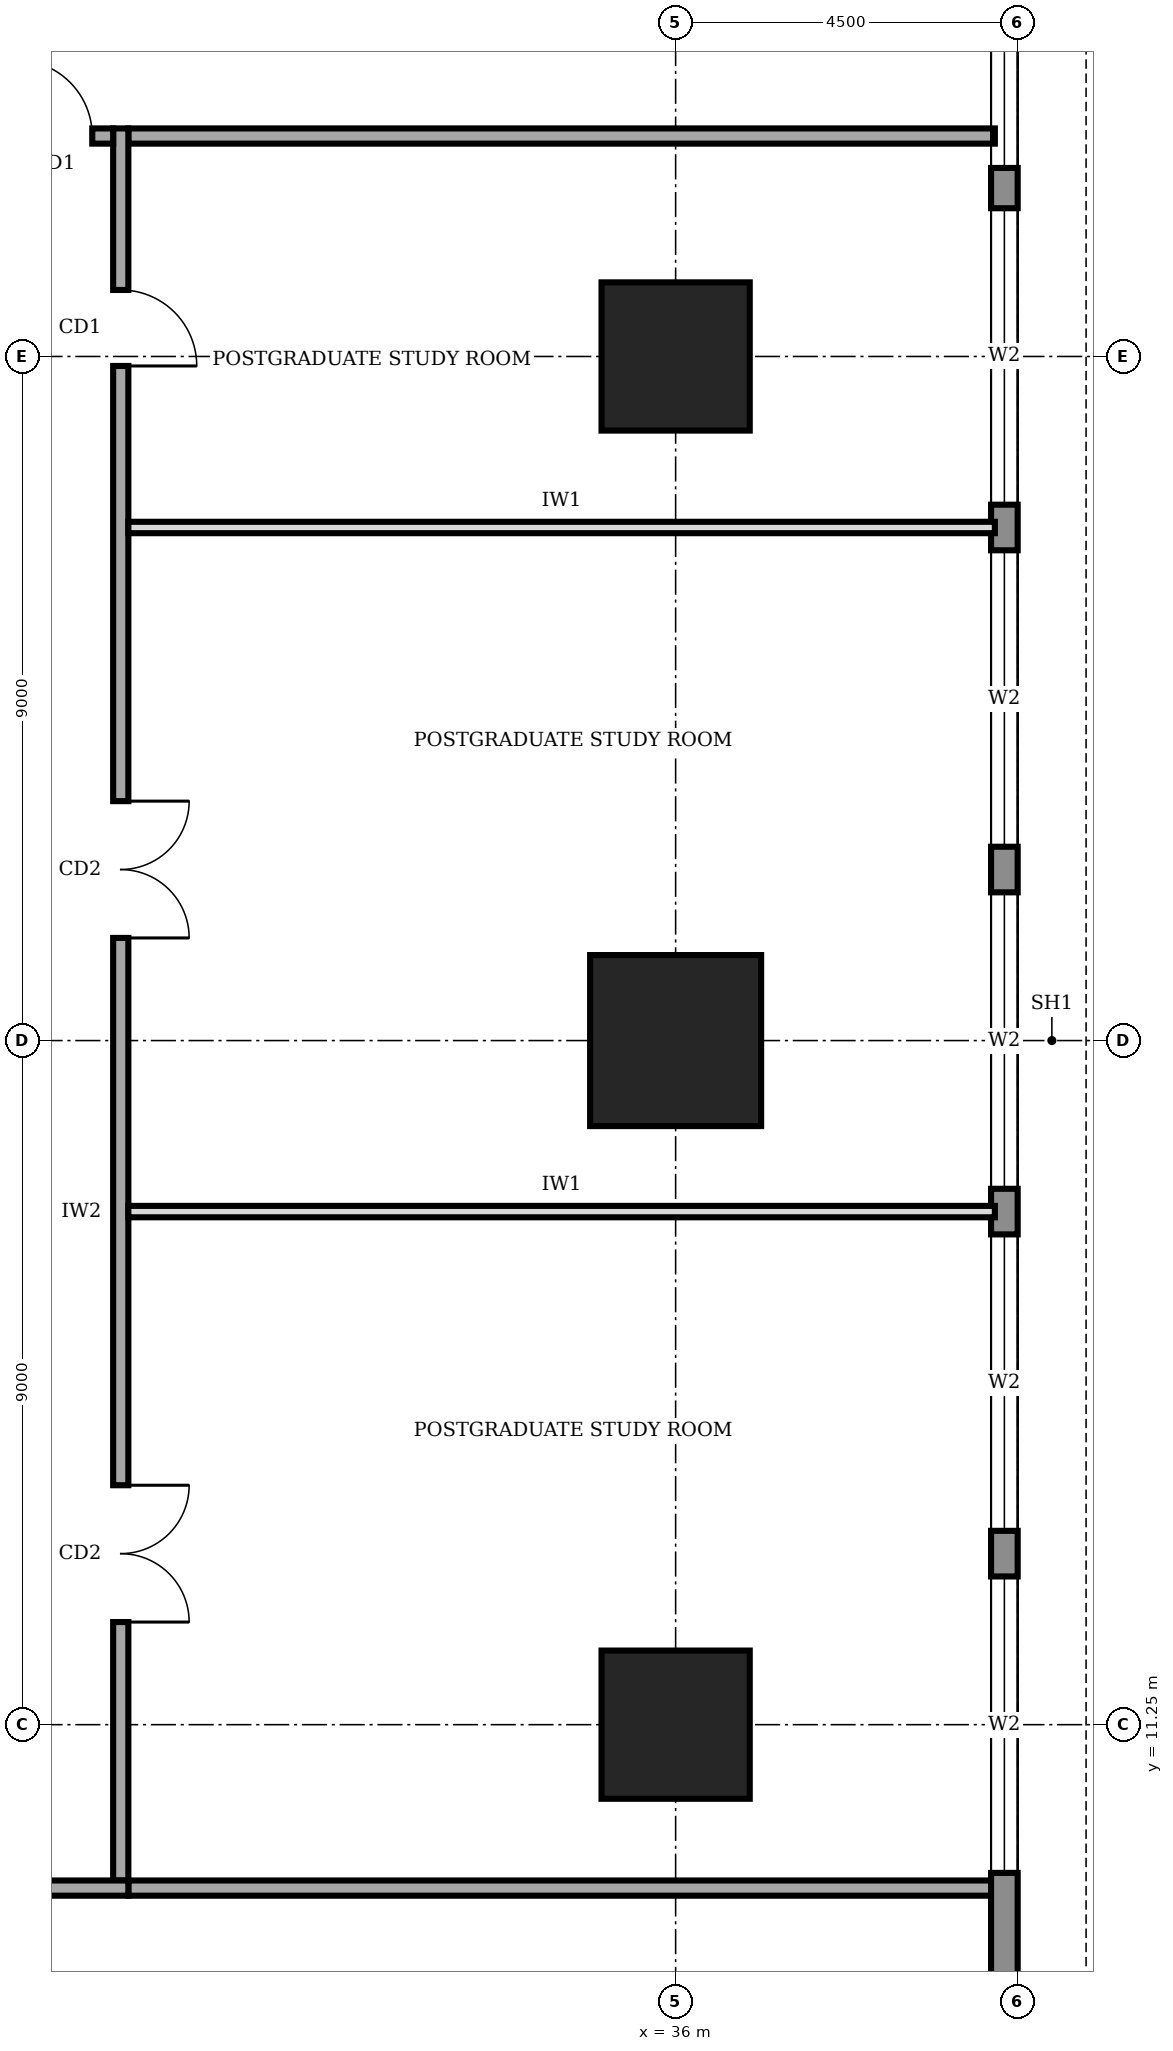
"""IFC4 building model, lengths in metres.
Left out: names, types, materials, properties, quantities, classifications, styles, units other than length and angle.
Written with IfcOpenShell. Run it as: python <this file> out.ifc"""

import sys

from ifc_helpers import new_model, si_unit, direction, frame, frame_2d, origin, origin_2d, place, context, subcontext, project, spatial, rectangle, extrude, element, fill, save


model = new_model("IFC4")
c1 = context("Model", 3, precision=1e-05, world=origin(), true_north=direction((0.0, 1.0)))
c2 = subcontext(c1, "Body", "Model", "MODEL_VIEW")
j1 = project(units=[si_unit("LENGTHUNIT", "METRE"), si_unit("PLANEANGLEUNIT", "RADIAN")], contexts=[c1])
p1 = place(None, origin())
s1 = spatial("IfcSite", under=j1, at=p1, CompositionType="ELEMENT")
p2 = place(p1, origin())
s2 = spatial("IfcBuilding", under=s1, at=p2, CompositionType="ELEMENT")
p3 = place(p2, frame((0.0, 0.0, 229.0)))
s3 = spatial("IfcBuildingStorey", under=s2, at=p3, CompositionType="ELEMENT", Elevation=229.0)
p4 = place(p3, frame((36.0, 11.25, 0.0), z_axis=(0.0, 0.0, 1.0), x_axis=(1.0, 0.0, 0.0)))
e1 = element("IfcColumn", 1, at=p4, inside=s3, PredefinedType="COLUMN", context=c2, shape_type="SweptSolid", body=[
    extrude(rectangle(XDim=1.95, YDim=1.95, at=origin_2d()), origin(), (0.0, 0.0, 1.0), 4.0),
])
p5 = place(p3, frame((36.0, 20.25, 0.0), z_axis=(0.0, 0.0, 1.0), x_axis=(1.0, 0.0, 0.0)))
e2 = element("IfcColumn", 2, at=p5, inside=s3, PredefinedType="COLUMN", context=c2, shape_type="SweptSolid", body=[
    extrude(rectangle(XDim=2.25, YDim=2.25, at=origin_2d()), origin(), (0.0, 0.0, 1.0), 4.0),
])
p6 = place(p3, frame((36.0, 29.25, 0.0), z_axis=(0.0, 0.0, 1.0), x_axis=(1.0, 0.0, 0.0)))
e3 = element("IfcColumn", 3, at=p6, inside=s3, PredefinedType="COLUMN", context=c2, shape_type="SweptSolid", body=[
    extrude(rectangle(XDim=1.95, YDim=1.95, at=origin_2d()), origin(), (0.0, 0.0, 1.0), 4.0),
])
p7 = place(p3, frame((40.325, 4.52, 0.0), z_axis=(0.0, 0.0, 1.0), x_axis=(0.0, 1.0, 0.0)))
e4 = element("IfcWall", 4, at=p7, inside=s3, PredefinedType="STANDARD", context=c2, shape_type="SweptSolid", body=[
    extrude(rectangle(XDim=31.46, YDim=0.35, at=frame_2d((15.73, 0.0))), origin(), (0.0, 0.0, 1.0), 3.75),
])
p8 = place(p7, frame((4.78, 0.0, 0.6)))
e5 = element("IfcOpeningElement", 5, at=p8, cuts=e4, PredefinedType="OPENING", context=c2, shape_type="SweptSolid", body=[
    extrude(rectangle(XDim=3.9, YDim=2.6, at=frame_2d((1.95, 1.3))), frame((0.0, 0.185, 0.0), z_axis=(0.0, -1.0, 0.0), x_axis=(1.0, 0.0, 0.0)), (0.0, 0.0, 1.0), 0.37),
])
p9 = place(p7, frame((9.28, 0.0, 0.6)))
e6 = element("IfcOpeningElement", 6, at=p9, cuts=e4, PredefinedType="OPENING", context=c2, shape_type="SweptSolid", body=[
    extrude(rectangle(XDim=3.9, YDim=2.6, at=frame_2d((1.95, 1.3))), frame((0.0, 0.185, 0.0), z_axis=(0.0, -1.0, 0.0), x_axis=(1.0, 0.0, 0.0)), (0.0, 0.0, 1.0), 0.37),
])
p10 = place(p7, frame((13.78, 0.0, 0.6)))
e7 = element("IfcOpeningElement", 7, at=p10, cuts=e4, PredefinedType="OPENING", context=c2, shape_type="SweptSolid", body=[
    extrude(rectangle(XDim=3.9, YDim=2.6, at=frame_2d((1.95, 1.3))), frame((0.0, 0.185, 0.0), z_axis=(0.0, -1.0, 0.0), x_axis=(1.0, 0.0, 0.0)), (0.0, 0.0, 1.0), 0.37),
])
p11 = place(p7, frame((18.28, 0.0, 0.6)))
e8 = element("IfcOpeningElement", 8, at=p11, cuts=e4, PredefinedType="OPENING", context=c2, shape_type="SweptSolid", body=[
    extrude(rectangle(XDim=3.9, YDim=2.6, at=frame_2d((1.95, 1.3))), frame((0.0, 0.185, 0.0), z_axis=(0.0, -1.0, 0.0), x_axis=(1.0, 0.0, 0.0)), (0.0, 0.0, 1.0), 0.37),
])
p12 = place(p7, frame((22.78, 0.0, 0.6)))
e9 = element("IfcOpeningElement", 9, at=p12, cuts=e4, PredefinedType="OPENING", context=c2, shape_type="SweptSolid", body=[
    extrude(rectangle(XDim=3.9, YDim=2.6, at=frame_2d((1.95, 1.3))), frame((0.0, 0.185, 0.0), z_axis=(0.0, -1.0, 0.0), x_axis=(1.0, 0.0, 0.0)), (0.0, 0.0, 1.0), 0.37),
])
p13 = place(p7, frame((27.21, 0.0, 0.6)))
e10 = element("IfcOpeningElement", 10, at=p13, cuts=e4, PredefinedType="OPENING", context=c2, shape_type="SweptSolid", body=[
    extrude(rectangle(XDim=3.9, YDim=2.6, at=frame_2d((1.95, 1.3))), frame((0.0, 0.185, 0.0), z_axis=(0.0, -1.0, 0.0), x_axis=(1.0, 0.0, 0.0)), (0.0, 0.0, 1.0), 0.37),
])
p14 = place(p3, frame((11.9, 9.1, 0.0), z_axis=(0.0, 0.0, 1.0), x_axis=(1.0, 0.0, 0.0)))
e11 = element("IfcWall", 11, at=p14, inside=s3, PredefinedType="SOLIDWALL", context=c2, shape_type="SweptSolid", body=[
    extrude(rectangle(XDim=16.9, YDim=0.2, at=frame_2d((8.45, 0.0))), origin(), (0.0, 0.0, 1.0), 3.75),
])
p15 = place(p3, frame((28.7, 9.2, 0.0), z_axis=(0.0, 0.0, 1.0), x_axis=(0.0, 1.0, 0.0)))
e12 = element("IfcWall", 12, at=p15, inside=s3, PredefinedType="SOLIDWALL", context=c2, shape_type="SweptSolid", body=[
    extrude(rectangle(XDim=23.05, YDim=0.2, at=frame_2d((11.525, 0.0))), origin(), (0.0, 0.0, 1.0), 3.75),
])
p16 = place(p15, frame((3.4, 0.0, 0.0)))
e13 = element("IfcOpeningElement", 13, at=p16, cuts=e12, PredefinedType="OPENING", context=c2, shape_type="SweptSolid", body=[
    extrude(rectangle(XDim=1.8, YDim=2.1, at=frame_2d((0.9, 1.05))), frame((0.0, 0.11, 0.0), z_axis=(0.0, -1.0, 0.0), x_axis=(1.0, 0.0, 0.0)), (0.0, 0.0, 1.0), 0.22),
])
p17 = place(p15, frame((12.4, 0.0, 0.0)))
e14 = element("IfcOpeningElement", 14, at=p17, cuts=e12, PredefinedType="OPENING", context=c2, shape_type="SweptSolid", body=[
    extrude(rectangle(XDim=1.8, YDim=2.1, at=frame_2d((0.9, 1.05))), frame((0.0, 0.11, 0.0), z_axis=(0.0, -1.0, 0.0), x_axis=(1.0, 0.0, 0.0)), (0.0, 0.0, 1.0), 0.22),
])
p18 = place(p15, frame((19.925, 0.0, 0.0)))
e15 = element("IfcOpeningElement", 15, at=p18, cuts=e12, PredefinedType="OPENING", context=c2, shape_type="SweptSolid", body=[
    extrude(rectangle(XDim=1.0, YDim=2.1, at=frame_2d((0.5, 1.05))), frame((0.0, 0.11, 0.0), z_axis=(0.0, -1.0, 0.0), x_axis=(1.0, 0.0, 0.0)), (0.0, 0.0, 1.0), 0.22),
])
p19 = place(p3, frame((28.6, 32.15, 0.0), z_axis=(0.0, 0.0, 1.0), x_axis=(-1.0, 0.0, 0.0)))
e16 = element("IfcWall", 16, at=p19, inside=s3, PredefinedType="SOLIDWALL", context=c2, shape_type="SweptSolid", body=[
    extrude(rectangle(XDim=16.9, YDim=0.2, at=frame_2d((8.45, 0.0))), origin(), (0.0, 0.0, 1.0), 3.75),
])
p20 = place(p19, frame((12.85, 0.0, 0.0)))
e17 = element("IfcOpeningElement", 17, at=p20, cuts=e16, PredefinedType="OPENING", context=c2, shape_type="SweptSolid", body=[
    extrude(rectangle(XDim=1.8, YDim=2.1, at=frame_2d((0.9, 1.05))), frame((0.0, 0.11, 0.0), z_axis=(0.0, -1.0, 0.0), x_axis=(1.0, 0.0, 0.0)), (0.0, 0.0, 1.0), 0.22),
])
p21 = place(p19, frame((5.6, 0.0, 0.0)))
e18 = element("IfcOpeningElement", 18, at=p21, cuts=e16, PredefinedType="OPENING", context=c2, shape_type="SweptSolid", body=[
    extrude(rectangle(XDim=1.0, YDim=2.1, at=frame_2d((0.5, 1.05))), frame((0.0, 0.11, 0.0), z_axis=(0.0, -1.0, 0.0), x_axis=(1.0, 0.0, 0.0)), (0.0, 0.0, 1.0), 0.22),
])
p22 = place(p19, frame((0.275, 0.0, 0.0)))
e19 = element("IfcOpeningElement", 19, at=p22, cuts=e16, PredefinedType="OPENING", context=c2, shape_type="SweptSolid", body=[
    extrude(rectangle(XDim=1.0, YDim=2.1, at=frame_2d((0.5, 1.05))), frame((0.0, 0.11, 0.0), z_axis=(0.0, -1.0, 0.0), x_axis=(1.0, 0.0, 0.0)), (0.0, 0.0, 1.0), 0.22),
])
for number, where, z_axis, x_axis in (
    (20, (28.8, 9.1, 0.0), (0.0, 0.0, 1.0), (1.0, 0.0, 0.0)),
    (21, (28.8, 32.15, 0.0), (0.0, 0.0, 1.0), (1.0, 0.0, 0.0)),
):
    element("IfcWall", number, at=place(p3, frame(where, z_axis=z_axis, x_axis=x_axis)), inside=s3, PredefinedType="SOLIDWALL", context=c2, shape_type="SweptSolid", body=[
        extrude(rectangle(XDim=11.4, YDim=0.2, at=frame_2d((5.7, 0.0))), origin(), (0.0, 0.0, 1.0), 3.75),
    ])
for number, where, z_axis, x_axis in (
    (22, (28.8, 18.0, 0.0), (0.0, 0.0, 1.0), (1.0, 0.0, 0.0)),
    (23, (28.8, 27.0, 0.0), (0.0, 0.0, 1.0), (1.0, 0.0, 0.0)),
):
    element("IfcWall", number, at=place(p3, frame(where, z_axis=z_axis, x_axis=x_axis)), inside=s3, PredefinedType="PARTITIONING", context=c2, shape_type="SweptSolid", body=[
        extrude(rectangle(XDim=11.4, YDim=0.15, at=frame_2d((5.7, 0.0))), origin(), (0.0, 0.0, 1.0), 3.75),
    ])
p23 = place(p8, origin())
e24 = element("IfcWindow", 24, at=p23, inside=s3, PartitioningType="SINGLE_PANEL", PredefinedType="WINDOW", context=c2, shape_type="SweptSolid", body=[
    extrude(rectangle(XDim=3.9, YDim=2.6, at=frame_2d((1.95, 1.3))), frame((0.0, 0.03, 0.0), z_axis=(0.0, -1.0, 0.0), x_axis=(1.0, 0.0, 0.0)), (0.0, 0.0, 1.0), 0.06),
])
fill(e5, e24)
p24 = place(p9, origin())
e25 = element("IfcWindow", 25, at=p24, inside=s3, PartitioningType="SINGLE_PANEL", PredefinedType="WINDOW", context=c2, shape_type="SweptSolid", body=[
    extrude(rectangle(XDim=3.9, YDim=2.6, at=frame_2d((1.95, 1.3))), frame((0.0, 0.03, 0.0), z_axis=(0.0, -1.0, 0.0), x_axis=(1.0, 0.0, 0.0)), (0.0, 0.0, 1.0), 0.06),
])
fill(e6, e25)
p25 = place(p10, origin())
e26 = element("IfcWindow", 26, at=p25, inside=s3, PartitioningType="SINGLE_PANEL", PredefinedType="WINDOW", context=c2, shape_type="SweptSolid", body=[
    extrude(rectangle(XDim=3.9, YDim=2.6, at=frame_2d((1.95, 1.3))), frame((0.0, 0.03, 0.0), z_axis=(0.0, -1.0, 0.0), x_axis=(1.0, 0.0, 0.0)), (0.0, 0.0, 1.0), 0.06),
])
fill(e7, e26)
p26 = place(p11, origin())
e27 = element("IfcWindow", 27, at=p26, inside=s3, PartitioningType="SINGLE_PANEL", PredefinedType="WINDOW", context=c2, shape_type="SweptSolid", body=[
    extrude(rectangle(XDim=3.9, YDim=2.6, at=frame_2d((1.95, 1.3))), frame((0.0, 0.03, 0.0), z_axis=(0.0, -1.0, 0.0), x_axis=(1.0, 0.0, 0.0)), (0.0, 0.0, 1.0), 0.06),
])
fill(e8, e27)
p27 = place(p12, origin())
e28 = element("IfcWindow", 28, at=p27, inside=s3, PartitioningType="SINGLE_PANEL", PredefinedType="WINDOW", context=c2, shape_type="SweptSolid", body=[
    extrude(rectangle(XDim=3.9, YDim=2.6, at=frame_2d((1.95, 1.3))), frame((0.0, 0.03, 0.0), z_axis=(0.0, -1.0, 0.0), x_axis=(1.0, 0.0, 0.0)), (0.0, 0.0, 1.0), 0.06),
])
fill(e9, e28)
p28 = place(p13, origin())
e29 = element("IfcWindow", 29, at=p28, inside=s3, PartitioningType="SINGLE_PANEL", PredefinedType="WINDOW", context=c2, shape_type="SweptSolid", body=[
    extrude(rectangle(XDim=3.9, YDim=2.6, at=frame_2d((1.95, 1.3))), frame((0.0, 0.03, 0.0), z_axis=(0.0, -1.0, 0.0), x_axis=(1.0, 0.0, 0.0)), (0.0, 0.0, 1.0), 0.06),
])
fill(e10, e29)
p29 = place(p16, frame((1.8, 0.0, 0.0), z_axis=(0.0, 0.0, 1.0), x_axis=(-1.0, 0.0, 0.0)))
e30 = element("IfcDoor", 30, at=p29, inside=s3, OperationType="DOUBLE_DOOR_SINGLE_SWING", PredefinedType="DOOR", context=c2, shape_type="SweptSolid", body=[
    extrude(rectangle(XDim=1.8, YDim=2.1, at=frame_2d((0.9, 1.05))), frame((0.0, 0.025, 0.0), z_axis=(0.0, -1.0, 0.0), x_axis=(1.0, 0.0, 0.0)), (0.0, 0.0, 1.0), 0.05),
])
fill(e13, e30)
p30 = place(p17, frame((1.8, 0.0, 0.0), z_axis=(0.0, 0.0, 1.0), x_axis=(-1.0, 0.0, 0.0)))
e31 = element("IfcDoor", 31, at=p30, inside=s3, OperationType="DOUBLE_DOOR_SINGLE_SWING", PredefinedType="DOOR", context=c2, shape_type="SweptSolid", body=[
    extrude(rectangle(XDim=1.8, YDim=2.1, at=frame_2d((0.9, 1.05))), frame((0.0, 0.025, 0.0), z_axis=(0.0, -1.0, 0.0), x_axis=(1.0, 0.0, 0.0)), (0.0, 0.0, 1.0), 0.05),
])
fill(e14, e31)
p31 = place(p18, frame((1.0, 0.0, 0.0), z_axis=(0.0, 0.0, 1.0), x_axis=(-1.0, 0.0, 0.0)))
e32 = element("IfcDoor", 32, at=p31, inside=s3, OperationType="SINGLE_SWING_RIGHT", PredefinedType="DOOR", context=c2, shape_type="SweptSolid", body=[
    extrude(rectangle(XDim=1.0, YDim=2.1, at=frame_2d((0.5, 1.05))), frame((0.0, 0.025, 0.0), z_axis=(0.0, -1.0, 0.0), x_axis=(1.0, 0.0, 0.0)), (0.0, 0.0, 1.0), 0.05),
])
fill(e15, e32)
p32 = place(p22, frame((1.0, 0.0, 0.0), z_axis=(0.0, 0.0, 1.0), x_axis=(-1.0, 0.0, 0.0)))
e33 = element("IfcDoor", 33, at=p32, inside=s3, OperationType="SINGLE_SWING_LEFT", PredefinedType="DOOR", context=c2, shape_type="SweptSolid", body=[
    extrude(rectangle(XDim=1.0, YDim=2.1, at=frame_2d((0.5, 1.05))), frame((0.0, 0.025, 0.0), z_axis=(0.0, -1.0, 0.0), x_axis=(1.0, 0.0, 0.0)), (0.0, 0.0, 1.0), 0.05),
])
fill(e19, e33)
save(model, sys.argv[1])
